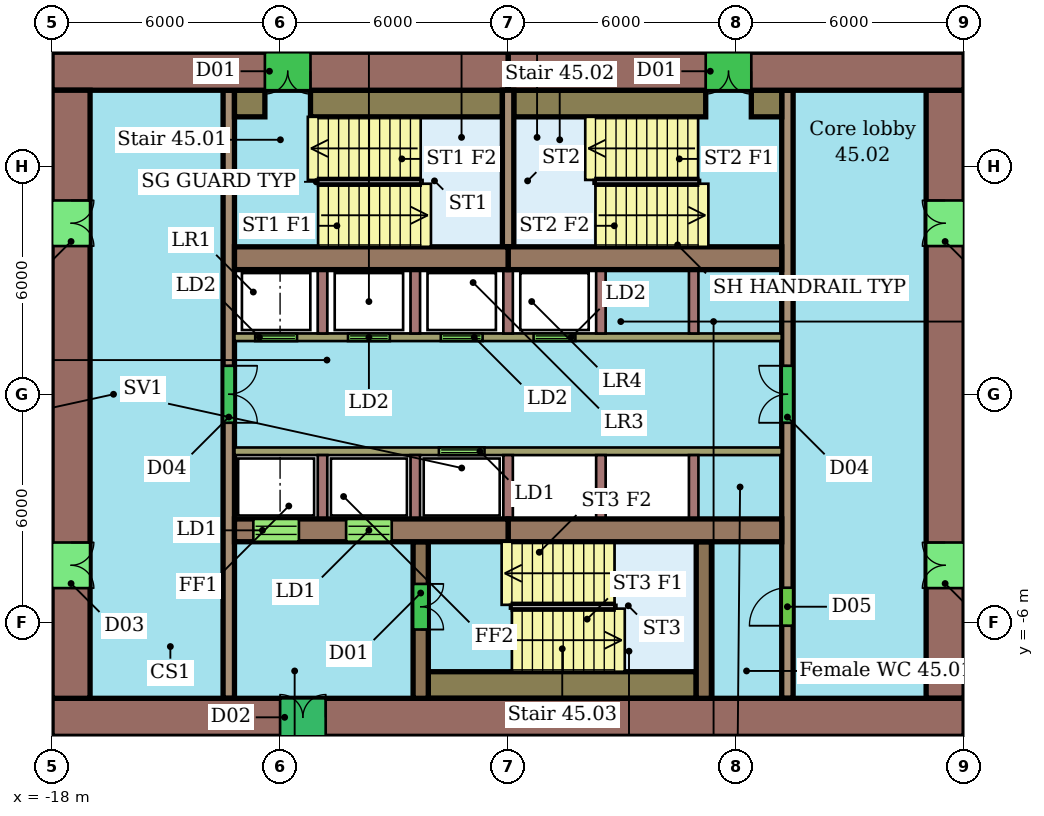
"""IFC4 building model, lengths in metres.
Left out: names, types, materials, properties, quantities, classifications, styles, units other than length and angle.
Written with IfcOpenShell. Run it as: python <this file> out.ifc"""

import sys

from ifc_helpers import new_model, si_unit, direction, frame, frame_2d, origin, place, context, subcontext, project, spatial, rectangle, extrude, element, fill, save


model = new_model("IFC4")
c1 = context("Model", 3, precision=1e-05, world=origin(), true_north=direction((0.0, 1.0)))
c2 = subcontext(c1, "Body", "Model", "MODEL_VIEW")
j1 = project(units=[si_unit("LENGTHUNIT", "METRE"), si_unit("PLANEANGLEUNIT", "RADIAN")], contexts=[c1])
p1 = place(None, origin())
s1 = spatial("IfcSite", under=j1, at=p1, CompositionType="ELEMENT")
p2 = place(p1, origin())
s2 = spatial("IfcBuilding", under=s1, at=p2, CompositionType="ELEMENT")
p3 = place(p2, frame((0.0, 0.0, 186.6)))
s3 = spatial("IfcBuildingStorey", under=s2, at=p3, CompositionType="ELEMENT", Elevation=186.6)
p4 = place(p3, frame((6.0, 8.5, 0.0), z_axis=(0.0, 0.0, 1.0), x_axis=(-1.0, 0.0, 0.0)))
e1 = element("IfcWall", 1, at=p4, inside=s3, PredefinedType="SHEAR", context=c2, shape_type="SweptSolid", body=[
    extrude(rectangle(XDim=12.0, YDim=1.0, at=frame_2d((6.0, 0.0))), origin(), (0.0, 0.0, 1.0), 3.15),
])
p5 = place(p4, frame((5.6, 0.0, 0.0)))
e2 = element("IfcOpeningElement", 2, at=p5, cuts=e1, PredefinedType="OPENING", context=c2, shape_type="SweptSolid", body=[
    extrude(rectangle(XDim=1.2, YDim=2.1, at=frame_2d((0.6, 1.05))), frame((0.0, 0.51, 0.0), z_axis=(0.0, -1.0, 0.0), x_axis=(1.0, 0.0, 0.0)), (0.0, 0.0, 1.0), 1.02),
])
p6 = place(p3, frame((-6.0, 8.5, 0.0), z_axis=(0.0, 0.0, 1.0), x_axis=(-1.0, 0.0, 0.0)))
e3 = element("IfcWall", 3, at=p6, inside=s3, PredefinedType="SHEAR", context=c2, shape_type="SweptSolid", body=[
    extrude(rectangle(XDim=12.0, YDim=1.0, at=frame_2d((6.0, 0.0))), origin(), (0.0, 0.0, 1.0), 3.15),
])
p7 = place(p6, frame((5.2, 0.0, 0.0)))
e4 = element("IfcOpeningElement", 4, at=p7, cuts=e3, PredefinedType="OPENING", context=c2, shape_type="SweptSolid", body=[
    extrude(rectangle(XDim=1.2, YDim=2.1, at=frame_2d((0.6, 1.05))), frame((0.0, 0.51, 0.0), z_axis=(0.0, -1.0, 0.0), x_axis=(1.0, 0.0, 0.0)), (0.0, 0.0, 1.0), 1.02),
])
p8 = place(p3, frame((-18.0, -8.5, 0.0), z_axis=(0.0, 0.0, 1.0), x_axis=(1.0, 0.0, 0.0)))
e5 = element("IfcWall", 5, at=p8, inside=s3, PredefinedType="SHEAR", context=c2, shape_type="SweptSolid", body=[
    extrude(rectangle(XDim=24.0, YDim=1.0, at=frame_2d((12.0, 0.0))), origin(), (0.0, 0.0, 1.0), 3.15),
])
p9 = place(p8, frame((6.0, 0.0, 0.0)))
e6 = element("IfcOpeningElement", 6, at=p9, cuts=e5, PredefinedType="OPENING", context=c2, shape_type="SweptSolid", body=[
    extrude(rectangle(XDim=1.2, YDim=2.1, at=frame_2d((0.6, 1.05))), frame((0.0, 0.51, 0.0), z_axis=(0.0, -1.0, 0.0), x_axis=(1.0, 0.0, 0.0)), (0.0, 0.0, 1.0), 1.02),
])
p10 = place(p3, frame((-17.5, 8.0, 0.0), z_axis=(0.0, 0.0, 1.0), x_axis=(0.0, -1.0, 0.0)))
e7 = element("IfcWall", 7, at=p10, inside=s3, PredefinedType="SHEAR", context=c2, shape_type="SweptSolid", body=[
    extrude(rectangle(XDim=16.0, YDim=1.0, at=frame_2d((8.0, 0.0))), origin(), (0.0, 0.0, 1.0), 3.15),
])
p11 = place(p10, frame((11.9, 0.0, 0.0)))
e8 = element("IfcOpeningElement", 8, at=p11, cuts=e7, PredefinedType="OPENING", context=c2, shape_type="SweptSolid", body=[
    extrude(rectangle(XDim=1.2, YDim=2.1, at=frame_2d((0.6, 1.05))), frame((0.0, 0.51, 0.0), z_axis=(0.0, -1.0, 0.0), x_axis=(1.0, 0.0, 0.0)), (0.0, 0.0, 1.0), 1.02),
])
p12 = place(p10, frame((2.9, 0.0, 0.0)))
e9 = element("IfcOpeningElement", 9, at=p12, cuts=e7, PredefinedType="OPENING", context=c2, shape_type="SweptSolid", body=[
    extrude(rectangle(XDim=1.2, YDim=2.1, at=frame_2d((0.6, 1.05))), frame((0.0, 0.51, 0.0), z_axis=(0.0, -1.0, 0.0), x_axis=(1.0, 0.0, 0.0)), (0.0, 0.0, 1.0), 1.02),
])
p13 = place(p3, frame((5.5, -8.0, 0.0), z_axis=(0.0, 0.0, 1.0), x_axis=(0.0, 1.0, 0.0)))
e10 = element("IfcWall", 10, at=p13, inside=s3, PredefinedType="SHEAR", context=c2, shape_type="SweptSolid", body=[
    extrude(rectangle(XDim=16.0, YDim=1.0, at=frame_2d((8.0, 0.0))), origin(), (0.0, 0.0, 1.0), 3.15),
])
p14 = place(p13, frame((2.9, 0.0, 0.0)))
e11 = element("IfcOpeningElement", 11, at=p14, cuts=e10, PredefinedType="OPENING", context=c2, shape_type="SweptSolid", body=[
    extrude(rectangle(XDim=1.2, YDim=2.1, at=frame_2d((0.6, 1.05))), frame((0.0, 0.51, 0.0), z_axis=(0.0, -1.0, 0.0), x_axis=(1.0, 0.0, 0.0)), (0.0, 0.0, 1.0), 1.02),
])
p15 = place(p13, frame((11.9, 0.0, 0.0)))
e12 = element("IfcOpeningElement", 12, at=p15, cuts=e10, PredefinedType="OPENING", context=c2, shape_type="SweptSolid", body=[
    extrude(rectangle(XDim=1.2, YDim=2.1, at=frame_2d((0.6, 1.05))), frame((0.0, 0.51, 0.0), z_axis=(0.0, -1.0, 0.0), x_axis=(1.0, 0.0, 0.0)), (0.0, 0.0, 1.0), 1.02),
])
for number, where, z_axis, x_axis in (
    (13, (-13.2, 3.58, 0.0), (0.0, 0.0, 1.0), (1.0, 0.0, 0.0)),
    (14, (-6.0, 3.58, 0.0), (0.0, 0.0, 1.0), (1.0, 0.0, 0.0)),
):
    element("IfcWall", number, at=place(p3, frame(where, z_axis=z_axis, x_axis=x_axis)), inside=s3, PredefinedType="SHEAR", context=c2, shape_type="SweptSolid", body=[
        extrude(rectangle(XDim=7.2, YDim=0.6, at=frame_2d((3.6, 0.0))), origin(), (0.0, 0.0, 1.0), 3.15),
    ])
p16 = place(p3, frame((-13.2, -3.58, 0.0), z_axis=(0.0, 0.0, 1.0), x_axis=(1.0, 0.0, 0.0)))
e15 = element("IfcWall", 15, at=p16, inside=s3, PredefinedType="SHEAR", context=c2, shape_type="SweptSolid", body=[
    extrude(rectangle(XDim=7.2, YDim=0.6, at=frame_2d((3.6, 0.0))), origin(), (0.0, 0.0, 1.0), 3.15),
])
p17 = place(p16, frame((0.496, 0.0, 0.0)))
e16 = element("IfcOpeningElement", 16, at=p17, cuts=e15, PredefinedType="OPENING", context=c2, shape_type="SweptSolid", body=[
    extrude(rectangle(XDim=1.2, YDim=2.1, at=frame_2d((0.6, 1.05))), frame((0.0, 0.31, 0.0), z_axis=(0.0, -1.0, 0.0), x_axis=(1.0, 0.0, 0.0)), (0.0, 0.0, 1.0), 0.62),
])
p18 = place(p16, frame((2.938, 0.0, 0.0)))
e17 = element("IfcOpeningElement", 17, at=p18, cuts=e15, PredefinedType="OPENING", context=c2, shape_type="SweptSolid", body=[
    extrude(rectangle(XDim=1.2, YDim=2.1, at=frame_2d((0.6, 1.05))), frame((0.0, 0.31, 0.0), z_axis=(0.0, -1.0, 0.0), x_axis=(1.0, 0.0, 0.0)), (0.0, 0.0, 1.0), 0.62),
])
p19 = place(p3, frame((-6.0, -3.58, 0.0), z_axis=(0.0, 0.0, 1.0), x_axis=(1.0, 0.0, 0.0)))
e18 = element("IfcWall", 18, at=p19, inside=s3, PredefinedType="SHEAR", context=c2, shape_type="SweptSolid", body=[
    extrude(rectangle(XDim=7.2, YDim=0.6, at=frame_2d((3.6, 0.0))), origin(), (0.0, 0.0, 1.0), 3.15),
])
p20 = place(p3, frame((-13.35, 8.0, 0.0), z_axis=(0.0, 0.0, 1.0), x_axis=(0.0, -1.0, 0.0)))
e19 = element("IfcWall", 19, at=p20, inside=s3, PredefinedType="SHEAR", context=c2, shape_type="SweptSolid", body=[
    extrude(rectangle(XDim=16.0, YDim=0.3, at=frame_2d((8.0, 0.0))), origin(), (0.0, 0.0, 1.0), 3.15),
])
p21 = place(p20, frame((7.25, 0.0, 0.0)))
e20 = element("IfcOpeningElement", 20, at=p21, cuts=e19, PredefinedType="OPENING", context=c2, shape_type="SweptSolid", body=[
    extrude(rectangle(XDim=1.5, YDim=2.1, at=frame_2d((0.75, 1.05))), frame((0.0, 0.16, 0.0), z_axis=(0.0, -1.0, 0.0), x_axis=(1.0, 0.0, 0.0)), (0.0, 0.0, 1.0), 0.32),
])
p22 = place(p3, frame((1.35, -8.0, 0.0), z_axis=(0.0, 0.0, 1.0), x_axis=(0.0, 1.0, 0.0)))
e21 = element("IfcWall", 21, at=p22, inside=s3, PredefinedType="SHEAR", context=c2, shape_type="SweptSolid", body=[
    extrude(rectangle(XDim=16.0, YDim=0.3, at=frame_2d((8.0, 0.0))), origin(), (0.0, 0.0, 1.0), 3.15),
])
p23 = place(p22, frame((1.91, 0.0, 0.0)))
e22 = element("IfcOpeningElement", 22, at=p23, cuts=e21, PredefinedType="OPENING", context=c2, shape_type="SweptSolid", body=[
    extrude(rectangle(XDim=1.0, YDim=2.1, at=frame_2d((0.5, 1.05))), frame((0.0, 0.16, 0.0), z_axis=(0.0, -1.0, 0.0), x_axis=(1.0, 0.0, 0.0)), (0.0, 0.0, 1.0), 0.32),
])
p24 = place(p22, frame((7.25, 0.0, 0.0)))
e23 = element("IfcOpeningElement", 23, at=p24, cuts=e21, PredefinedType="OPENING", context=c2, shape_type="SweptSolid", body=[
    extrude(rectangle(XDim=1.5, YDim=2.1, at=frame_2d((0.75, 1.05))), frame((0.0, 0.16, 0.0), z_axis=(0.0, -1.0, 0.0), x_axis=(1.0, 0.0, 0.0)), (0.0, 0.0, 1.0), 0.32),
])
p25 = place(p3, frame((-13.2, 1.5, 0.0), z_axis=(0.0, 0.0, 1.0), x_axis=(1.0, 0.0, 0.0)))
e24 = element("IfcWall", 24, at=p25, inside=s3, PredefinedType="SHEAR", context=c2, shape_type="SweptSolid", body=[
    extrude(rectangle(XDim=14.4, YDim=0.2, at=frame_2d((7.2, 0.0))), origin(), (0.0, 0.0, 1.0), 3.15),
])
p26 = place(p25, frame((0.546, 0.0, 0.0)))
e25 = element("IfcOpeningElement", 25, at=p26, cuts=e24, PredefinedType="OPENING", context=c2, shape_type="SweptSolid", body=[
    extrude(rectangle(XDim=1.1, YDim=2.1, at=frame_2d((0.55, 1.05))), frame((0.0, 0.11, 0.0), z_axis=(0.0, -1.0, 0.0), x_axis=(1.0, 0.0, 0.0)), (0.0, 0.0, 1.0), 0.22),
])
p27 = place(p25, frame((2.988, 0.0, 0.0)))
e26 = element("IfcOpeningElement", 26, at=p27, cuts=e24, PredefinedType="OPENING", context=c2, shape_type="SweptSolid", body=[
    extrude(rectangle(XDim=1.1, YDim=2.1, at=frame_2d((0.55, 1.05))), frame((0.0, 0.11, 0.0), z_axis=(0.0, -1.0, 0.0), x_axis=(1.0, 0.0, 0.0)), (0.0, 0.0, 1.0), 0.22),
])
p28 = place(p25, frame((5.429, 0.0, 0.0)))
e27 = element("IfcOpeningElement", 27, at=p28, cuts=e24, PredefinedType="OPENING", context=c2, shape_type="SweptSolid", body=[
    extrude(rectangle(XDim=1.1, YDim=2.1, at=frame_2d((0.55, 1.05))), frame((0.0, 0.11, 0.0), z_axis=(0.0, -1.0, 0.0), x_axis=(1.0, 0.0, 0.0)), (0.0, 0.0, 1.0), 0.22),
])
p29 = place(p25, frame((7.871, 0.0, 0.0)))
e28 = element("IfcOpeningElement", 28, at=p29, cuts=e24, PredefinedType="OPENING", context=c2, shape_type="SweptSolid", body=[
    extrude(rectangle(XDim=1.1, YDim=2.1, at=frame_2d((0.55, 1.05))), frame((0.0, 0.11, 0.0), z_axis=(0.0, -1.0, 0.0), x_axis=(1.0, 0.0, 0.0)), (0.0, 0.0, 1.0), 0.22),
])
p30 = place(p3, frame((1.2, -1.5, 0.0), z_axis=(0.0, 0.0, 1.0), x_axis=(-1.0, 0.0, 0.0)))
e29 = element("IfcWall", 29, at=p30, inside=s3, PredefinedType="SHEAR", context=c2, shape_type="SweptSolid", body=[
    extrude(rectangle(XDim=14.4, YDim=0.2, at=frame_2d((7.2, 0.0))), origin(), (0.0, 0.0, 1.0), 3.15),
])
p31 = place(p30, frame((7.821, 0.0, 0.0)))
e30 = element("IfcOpeningElement", 30, at=p31, cuts=e29, PredefinedType="OPENING", context=c2, shape_type="SweptSolid", body=[
    extrude(rectangle(XDim=1.2, YDim=2.1, at=frame_2d((0.6, 1.05))), frame((0.0, 0.11, 0.0), z_axis=(0.0, -1.0, 0.0), x_axis=(1.0, 0.0, 0.0)), (0.0, 0.0, 1.0), 0.22),
])
p32 = place(p3, frame((-8.3, -3.88, 0.0), z_axis=(0.0, 0.0, 1.0), x_axis=(0.0, -1.0, 0.0)))
e31 = element("IfcWall", 31, at=p32, inside=s3, PredefinedType="SHEAR", context=c2, shape_type="SweptSolid", body=[
    extrude(rectangle(XDim=4.12, YDim=0.4, at=frame_2d((2.06, 0.0))), origin(), (0.0, 0.0, 1.0), 3.15),
])
p33 = place(p32, frame((1.11, 0.0, 0.0)))
e32 = element("IfcOpeningElement", 32, at=p33, cuts=e31, PredefinedType="OPENING", context=c2, shape_type="SweptSolid", body=[
    extrude(rectangle(XDim=1.2, YDim=2.1, at=frame_2d((0.6, 1.05))), frame((0.0, 0.21, 0.0), z_axis=(0.0, -1.0, 0.0), x_axis=(1.0, 0.0, 0.0)), (0.0, 0.0, 1.0), 0.42),
])
p34 = place(p3, frame((-0.85, -3.88, 0.0), z_axis=(0.0, 0.0, 1.0), x_axis=(0.0, -1.0, 0.0)))
e33 = element("IfcWall", 33, at=p34, inside=s3, PredefinedType="SHEAR", context=c2, shape_type="SweptSolid", body=[
    extrude(rectangle(XDim=4.12, YDim=0.4, at=frame_2d((2.06, 0.0))), origin(), (0.0, 0.0, 1.0), 3.15),
])
p35 = place(p3, frame((-6.0, 3.88, 0.0), z_axis=(0.0, 0.0, 1.0), x_axis=(0.0, 1.0, 0.0)))
e34 = element("IfcWall", 34, at=p35, inside=s3, PredefinedType="SHEAR", context=c2, shape_type="SweptSolid", body=[
    extrude(rectangle(XDim=4.12, YDim=0.3, at=frame_2d((2.06, 0.0))), origin(), (0.0, 0.0, 1.0), 3.15),
])
p36 = place(p3, frame((-13.2, 7.65, 0.0), z_axis=(0.0, 0.0, 1.0), x_axis=(1.0, 0.0, 0.0)))
e35 = element("IfcWall", 35, at=p36, inside=s3, PredefinedType="SHEAR", context=c2, shape_type="SweptSolid", body=[
    extrude(rectangle(XDim=0.8, YDim=0.7, at=frame_2d((0.4, 0.0))), origin(), (0.0, 0.0, 1.0), 3.15),
])
for number, where, z_axis, x_axis in (
    (36, (-11.2, 7.65, 0.0), (0.0, 0.0, 1.0), (1.0, 0.0, 0.0)),
    (37, (-5.85, 7.65, 0.0), (0.0, 0.0, 1.0), (1.0, 0.0, 0.0)),
):
    element("IfcWall", number, at=place(p3, frame(where, z_axis=z_axis, x_axis=x_axis)), inside=s3, PredefinedType="SHEAR", context=c2, shape_type="SweptSolid", body=[
        extrude(rectangle(XDim=5.05, YDim=0.7, at=frame_2d((2.525, 0.0))), origin(), (0.0, 0.0, 1.0), 3.15),
    ])
p37 = place(p3, frame((0.4, 7.65, 0.0), z_axis=(0.0, 0.0, 1.0), x_axis=(1.0, 0.0, 0.0)))
e38 = element("IfcWall", 38, at=p37, inside=s3, PredefinedType="SHEAR", context=c2, shape_type="SweptSolid", body=[
    extrude(rectangle(XDim=0.8, YDim=0.7, at=frame_2d((0.4, 0.0))), origin(), (0.0, 0.0, 1.0), 3.15),
])
p38 = place(p3, frame((-8.1, -7.65, 0.0), z_axis=(0.0, 0.0, 1.0), x_axis=(1.0, 0.0, 0.0)))
e39 = element("IfcWall", 39, at=p38, inside=s3, PredefinedType="SHEAR", context=c2, shape_type="SweptSolid", body=[
    extrude(rectangle(XDim=7.05, YDim=0.7, at=frame_2d((3.525, 0.0))), origin(), (0.0, 0.0, 1.0), 3.15),
])
for number, where, z_axis, x_axis in (
    (40, (-10.883, 1.6, 0.0), (0.0, 0.0, 1.0), (0.0, 1.0, 0.0)),
    (41, (-8.442, 1.6, 0.0), (0.0, 0.0, 1.0), (0.0, 1.0, 0.0)),
    (42, (-6.0, 1.6, 0.0), (0.0, 0.0, 1.0), (0.0, 1.0, 0.0)),
    (43, (-3.558, 1.6, 0.0), (0.0, 0.0, 1.0), (0.0, 1.0, 0.0)),
    (44, (-1.117, 1.6, 0.0), (0.0, 0.0, 1.0), (0.0, 1.0, 0.0)),
    (45, (-10.883, -1.6, 0.0), (0.0, 0.0, 1.0), (0.0, -1.0, 0.0)),
    (46, (-8.442, -1.6, 0.0), (0.0, 0.0, 1.0), (0.0, -1.0, 0.0)),
    (47, (-6.0, -1.6, 0.0), (0.0, 0.0, 1.0), (0.0, -1.0, 0.0)),
    (48, (-3.558, -1.6, 0.0), (0.0, 0.0, 1.0), (0.0, -1.0, 0.0)),
    (49, (-1.117, -1.6, 0.0), (0.0, 0.0, 1.0), (0.0, -1.0, 0.0)),
):
    element("IfcWall", number, at=place(p3, frame(where, z_axis=z_axis, x_axis=x_axis)), inside=s3, PredefinedType="SHEAR", context=c2, shape_type="SweptSolid", body=[
        extrude(rectangle(XDim=1.68, YDim=0.25, at=frame_2d((0.84, 0.0))), origin(), (0.0, 0.0, 1.0), 3.15),
    ])
p39 = place(p5, origin())
e50 = element("IfcDoor", 50, at=p39, inside=s3, OperationType="DOUBLE_DOOR_SINGLE_SWING", PredefinedType="NOTDEFINED", context=c2, shape_type="SweptSolid", body=[
    extrude(rectangle(XDim=1.2, YDim=2.1, at=frame_2d((0.6, 1.05))), frame((0.0, 0.025, 0.0), z_axis=(0.0, -1.0, 0.0), x_axis=(1.0, 0.0, 0.0)), (0.0, 0.0, 1.0), 0.05),
])
fill(e2, e50)
p40 = place(p7, origin())
e51 = element("IfcDoor", 51, at=p40, inside=s3, OperationType="DOUBLE_DOOR_SINGLE_SWING", PredefinedType="NOTDEFINED", context=c2, shape_type="SweptSolid", body=[
    extrude(rectangle(XDim=1.2, YDim=2.1, at=frame_2d((0.6, 1.05))), frame((0.0, 0.025, 0.0), z_axis=(0.0, -1.0, 0.0), x_axis=(1.0, 0.0, 0.0)), (0.0, 0.0, 1.0), 0.05),
])
fill(e4, e51)
p41 = place(p9, origin())
e52 = element("IfcDoor", 52, at=p41, inside=s3, OperationType="DOUBLE_DOOR_SINGLE_SWING", PredefinedType="NOTDEFINED", context=c2, shape_type="SweptSolid", body=[
    extrude(rectangle(XDim=1.2, YDim=2.1, at=frame_2d((0.6, 1.05))), frame((0.0, 0.025, 0.0), z_axis=(0.0, -1.0, 0.0), x_axis=(1.0, 0.0, 0.0)), (0.0, 0.0, 1.0), 0.05),
])
fill(e6, e52)
p42 = place(p11, origin())
e53 = element("IfcDoor", 53, at=p42, inside=s3, OperationType="DOUBLE_DOOR_SINGLE_SWING", PredefinedType="NOTDEFINED", context=c2, shape_type="SweptSolid", body=[
    extrude(rectangle(XDim=1.2, YDim=2.1, at=frame_2d((0.6, 1.05))), frame((0.0, 0.025, 0.0), z_axis=(0.0, -1.0, 0.0), x_axis=(1.0, 0.0, 0.0)), (0.0, 0.0, 1.0), 0.05),
])
fill(e8, e53)
p43 = place(p12, origin())
e54 = element("IfcDoor", 54, at=p43, inside=s3, OperationType="DOUBLE_DOOR_SINGLE_SWING", PredefinedType="NOTDEFINED", context=c2, shape_type="SweptSolid", body=[
    extrude(rectangle(XDim=1.2, YDim=2.1, at=frame_2d((0.6, 1.05))), frame((0.0, 0.025, 0.0), z_axis=(0.0, -1.0, 0.0), x_axis=(1.0, 0.0, 0.0)), (0.0, 0.0, 1.0), 0.05),
])
fill(e9, e54)
p44 = place(p14, origin())
e55 = element("IfcDoor", 55, at=p44, inside=s3, OperationType="DOUBLE_DOOR_SINGLE_SWING", PredefinedType="NOTDEFINED", context=c2, shape_type="SweptSolid", body=[
    extrude(rectangle(XDim=1.2, YDim=2.1, at=frame_2d((0.6, 1.05))), frame((0.0, 0.025, 0.0), z_axis=(0.0, -1.0, 0.0), x_axis=(1.0, 0.0, 0.0)), (0.0, 0.0, 1.0), 0.05),
])
fill(e11, e55)
p45 = place(p15, origin())
e56 = element("IfcDoor", 56, at=p45, inside=s3, OperationType="DOUBLE_DOOR_SINGLE_SWING", PredefinedType="NOTDEFINED", context=c2, shape_type="SweptSolid", body=[
    extrude(rectangle(XDim=1.2, YDim=2.1, at=frame_2d((0.6, 1.05))), frame((0.0, 0.025, 0.0), z_axis=(0.0, -1.0, 0.0), x_axis=(1.0, 0.0, 0.0)), (0.0, 0.0, 1.0), 0.05),
])
fill(e12, e56)
p46 = place(p17, origin())
e57 = element("IfcDoor", 57, at=p46, inside=s3, OperationType="DOUBLE_DOOR_SLIDING", PredefinedType="NOTDEFINED", context=c2, shape_type="SweptSolid", body=[
    extrude(rectangle(XDim=1.2, YDim=2.1, at=frame_2d((0.6, 1.05))), frame((0.0, 0.025, 0.0), z_axis=(0.0, -1.0, 0.0), x_axis=(1.0, 0.0, 0.0)), (0.0, 0.0, 1.0), 0.05),
])
fill(e16, e57)
p47 = place(p18, origin())
e58 = element("IfcDoor", 58, at=p47, inside=s3, OperationType="DOUBLE_DOOR_SLIDING", PredefinedType="NOTDEFINED", context=c2, shape_type="SweptSolid", body=[
    extrude(rectangle(XDim=1.2, YDim=2.1, at=frame_2d((0.6, 1.05))), frame((0.0, 0.025, 0.0), z_axis=(0.0, -1.0, 0.0), x_axis=(1.0, 0.0, 0.0)), (0.0, 0.0, 1.0), 0.05),
])
fill(e17, e58)
p48 = place(p21, origin())
e59 = element("IfcDoor", 59, at=p48, inside=s3, OperationType="DOUBLE_DOOR_SINGLE_SWING", PredefinedType="NOTDEFINED", context=c2, shape_type="SweptSolid", body=[
    extrude(rectangle(XDim=1.5, YDim=2.1, at=frame_2d((0.75, 1.05))), frame((0.0, 0.025, 0.0), z_axis=(0.0, -1.0, 0.0), x_axis=(1.0, 0.0, 0.0)), (0.0, 0.0, 1.0), 0.05),
])
fill(e20, e59)
p49 = place(p23, origin())
e60 = element("IfcDoor", 60, at=p49, inside=s3, OperationType="SINGLE_SWING_LEFT", PredefinedType="NOTDEFINED", context=c2, shape_type="SweptSolid", body=[
    extrude(rectangle(XDim=1.0, YDim=2.1, at=frame_2d((0.5, 1.05))), frame((0.0, 0.025, 0.0), z_axis=(0.0, -1.0, 0.0), x_axis=(1.0, 0.0, 0.0)), (0.0, 0.0, 1.0), 0.05),
])
fill(e22, e60)
p50 = place(p24, origin())
e61 = element("IfcDoor", 61, at=p50, inside=s3, OperationType="DOUBLE_DOOR_SINGLE_SWING", PredefinedType="NOTDEFINED", context=c2, shape_type="SweptSolid", body=[
    extrude(rectangle(XDim=1.5, YDim=2.1, at=frame_2d((0.75, 1.05))), frame((0.0, 0.025, 0.0), z_axis=(0.0, -1.0, 0.0), x_axis=(1.0, 0.0, 0.0)), (0.0, 0.0, 1.0), 0.05),
])
fill(e23, e61)
p51 = place(p26, origin())
e62 = element("IfcDoor", 62, at=p51, inside=s3, OperationType="DOUBLE_DOOR_SLIDING", PredefinedType="NOTDEFINED", context=c2, shape_type="SweptSolid", body=[
    extrude(rectangle(XDim=1.1, YDim=2.1, at=frame_2d((0.55, 1.05))), frame((0.0, 0.025, 0.0), z_axis=(0.0, -1.0, 0.0), x_axis=(1.0, 0.0, 0.0)), (0.0, 0.0, 1.0), 0.05),
])
fill(e25, e62)
p52 = place(p27, origin())
e63 = element("IfcDoor", 63, at=p52, inside=s3, OperationType="DOUBLE_DOOR_SLIDING", PredefinedType="NOTDEFINED", context=c2, shape_type="SweptSolid", body=[
    extrude(rectangle(XDim=1.1, YDim=2.1, at=frame_2d((0.55, 1.05))), frame((0.0, 0.025, 0.0), z_axis=(0.0, -1.0, 0.0), x_axis=(1.0, 0.0, 0.0)), (0.0, 0.0, 1.0), 0.05),
])
fill(e26, e63)
p53 = place(p28, origin())
e64 = element("IfcDoor", 64, at=p53, inside=s3, OperationType="DOUBLE_DOOR_SLIDING", PredefinedType="NOTDEFINED", context=c2, shape_type="SweptSolid", body=[
    extrude(rectangle(XDim=1.1, YDim=2.1, at=frame_2d((0.55, 1.05))), frame((0.0, 0.025, 0.0), z_axis=(0.0, -1.0, 0.0), x_axis=(1.0, 0.0, 0.0)), (0.0, 0.0, 1.0), 0.05),
])
fill(e27, e64)
p54 = place(p29, origin())
e65 = element("IfcDoor", 65, at=p54, inside=s3, OperationType="DOUBLE_DOOR_SLIDING", PredefinedType="NOTDEFINED", context=c2, shape_type="SweptSolid", body=[
    extrude(rectangle(XDim=1.1, YDim=2.1, at=frame_2d((0.55, 1.05))), frame((0.0, 0.025, 0.0), z_axis=(0.0, -1.0, 0.0), x_axis=(1.0, 0.0, 0.0)), (0.0, 0.0, 1.0), 0.05),
])
fill(e28, e65)
p55 = place(p31, origin())
e66 = element("IfcDoor", 66, at=p55, inside=s3, OperationType="DOUBLE_DOOR_SLIDING", PredefinedType="NOTDEFINED", context=c2, shape_type="SweptSolid", body=[
    extrude(rectangle(XDim=1.2, YDim=2.1, at=frame_2d((0.6, 1.05))), frame((0.0, 0.025, 0.0), z_axis=(0.0, -1.0, 0.0), x_axis=(1.0, 0.0, 0.0)), (0.0, 0.0, 1.0), 0.05),
])
fill(e30, e66)
p56 = place(p33, origin())
e67 = element("IfcDoor", 67, at=p56, inside=s3, OperationType="DOUBLE_DOOR_SINGLE_SWING", PredefinedType="NOTDEFINED", context=c2, shape_type="SweptSolid", body=[
    extrude(rectangle(XDim=1.2, YDim=2.1, at=frame_2d((0.6, 1.05))), frame((0.0, 0.025, 0.0), z_axis=(0.0, -1.0, 0.0), x_axis=(1.0, 0.0, 0.0)), (0.0, 0.0, 1.0), 0.05),
])
fill(e32, e67)
save(model, sys.argv[1])
